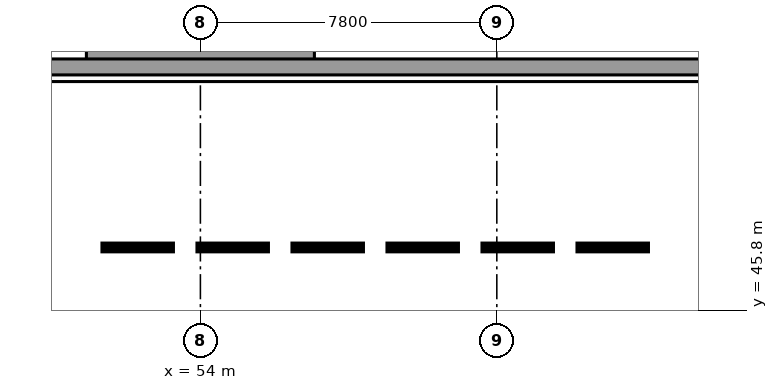
"""IFC4 building model, lengths in metres.
Left out: names, types, materials, properties, quantities, classifications, styles, units other than length and angle.
Written with IfcOpenShell. Run it as: python <this file> out.ifc"""

import sys

from ifc_helpers import new_model, si_unit, direction, frame, frame_2d, origin, place, context, subcontext, project, spatial, rectangle, extrude, element, save


model = new_model("IFC4")
c1 = context("Model", 3, precision=1e-05, world=origin(), true_north=direction((0.0, 1.0)))
c2 = subcontext(c1, "Body", "Model", "MODEL_VIEW")
j1 = project(units=[si_unit("LENGTHUNIT", "METRE"), si_unit("PLANEANGLEUNIT", "RADIAN")], contexts=[c1])
p1 = place(None, origin())
s1 = spatial("IfcSite", under=j1, at=p1, CompositionType="ELEMENT")
p2 = place(p1, origin())
s2 = spatial("IfcBuilding", under=s1, at=p2, CompositionType="ELEMENT")
p3 = place(p2, frame((0.0, 0.0, -8.16)))
s3 = spatial("IfcBuildingStorey", under=s2, at=p3, CompositionType="ELEMENT", Elevation=-8.16)
p4 = place(p3, frame((51.0, 52.55, 0.0), z_axis=(0.0, 0.0, 1.0), x_axis=(1.0, 0.0, 0.0)))
e1 = element("IfcWall", 1, at=p4, inside=s3, PredefinedType="SOLIDWALL", context=c2, shape_type="SweptSolid", body=[
    extrude(rectangle(XDim=6.0, YDim=0.42, at=frame_2d((3.0, 0.0))), origin(), (0.0, 0.0, 1.0), 4.08),
])
p5 = place(p3, frame((1.7, 52.2, 0.0), z_axis=(0.0, 0.0, 1.0), x_axis=(1.0, 0.0, 0.0)))
e2 = element("IfcWall", 2, at=p5, inside=s3, PredefinedType="SOLIDWALL", context=c2, shape_type="SweptSolid", body=[
    extrude(rectangle(XDim=73.4, YDim=0.42, at=frame_2d((36.7, 0.0))), origin(), (0.0, 0.0, 1.0), 3.76),
])
save(model, sys.argv[1])
